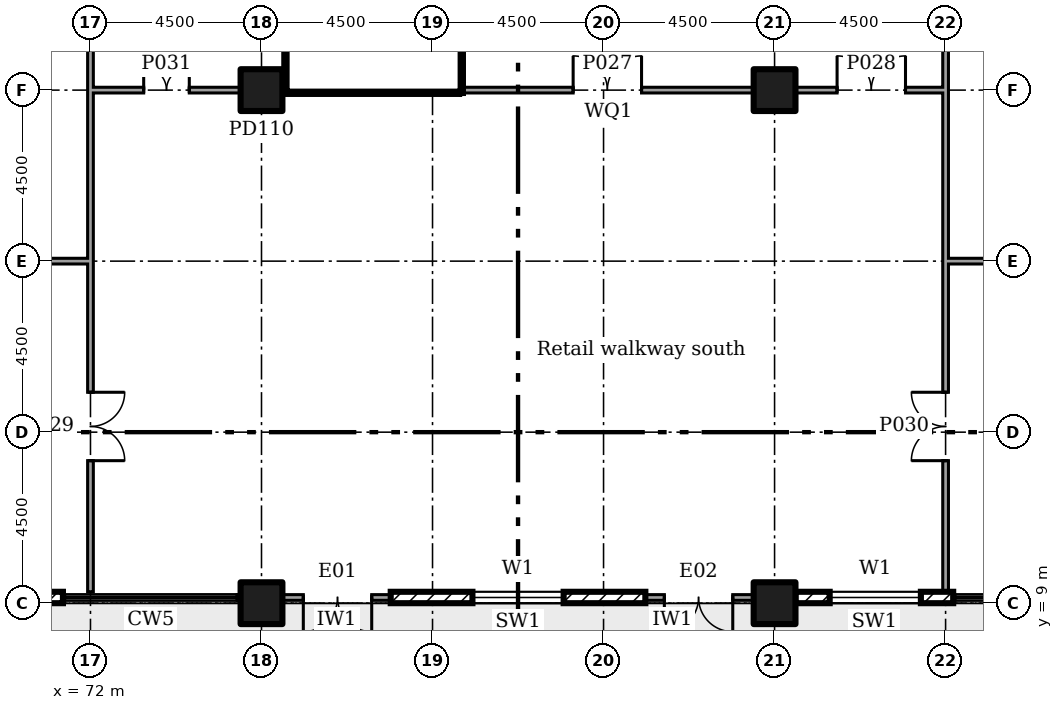
"""IFC4 building model, lengths in metres.
Left out: names, types, materials, properties, quantities, classifications, styles, units other than length and angle.
Written with IfcOpenShell. Run it as: python <this file> out.ifc"""

import sys

from ifc_helpers import new_model, si_unit, direction, frame, frame_2d, origin, origin_2d, place, context, subcontext, project, spatial, rectangle, extrude, element, fill, save


model = new_model("IFC4")
c1 = context("Model", 3, precision=1e-05, world=origin(), true_north=direction((0.0, 1.0)))
c2 = subcontext(c1, "Body", "Model", "MODEL_VIEW")
j1 = project(units=[si_unit("LENGTHUNIT", "METRE"), si_unit("PLANEANGLEUNIT", "RADIAN")], contexts=[c1])
p1 = place(None, origin())
s1 = spatial("IfcSite", under=j1, at=p1, CompositionType="ELEMENT")
p2 = place(p1, origin())
s2 = spatial("IfcBuilding", under=s1, at=p2, CompositionType="ELEMENT")
p3 = place(p2, frame((0.0, 0.0, 6.0)))
s3 = spatial("IfcBuildingStorey", under=s2, at=p3, CompositionType="ELEMENT", Elevation=6.0)
for number, where in (
    (1, (76.5, 9.0, 0.0)),
    (2, (76.5, 22.5, 0.0)),
    (3, (90.0, 9.0, 0.0)),
    (4, (90.0, 22.5, 0.0)),
):
    element("IfcColumn", number, at=place(p3, frame(where)), inside=s3, PredefinedType="COLUMN", context=c2, shape_type="SweptSolid", body=[
        extrude(rectangle(XDim=1.1, YDim=1.1, at=origin_2d()), origin(), (0.0, 0.0, 1.0), 5.5),
    ])
p4 = place(p3, frame((66.65, 9.15, 0.0)))
e5 = element("IfcWall", 5, at=p4, inside=s3, PredefinedType="ELEMENTEDWALL", context=c2, shape_type="SweptSolid", body=[
    extrude(rectangle(XDim=4.625, YDim=0.3, at=frame_2d((2.312, 0.0))), origin(), (0.0, 0.0, 1.0), 5.05),
])
p5 = place(p4, frame((2.012, 0.0, 0.45)))
e6 = element("IfcOpeningElement", 6, at=p5, cuts=e5, PredefinedType="OPENING", context=c2, shape_type="SweptSolid", body=[
    extrude(rectangle(XDim=0.6, YDim=2.4, at=frame_2d((0.3, 1.2))), frame((0.0, 0.16, 0.0), z_axis=(0.0, -1.0, 0.0), x_axis=(1.0, 0.0, 0.0)), (0.0, 0.0, 1.0), 0.32),
])
p6 = place(p3, frame((77.05, 9.15, 0.0)))
e7 = element("IfcWall", 7, at=p6, inside=s3, PredefinedType="SOLIDWALL", context=c2, shape_type="SweptSolid", body=[
    extrude(rectangle(XDim=2.85, YDim=0.15, at=frame_2d((1.425, 0.0))), origin(), (0.0, 0.0, 1.0), 5.05),
])
p7 = place(p6, frame((0.55, 0.0, 0.0)))
e8 = element("IfcOpeningElement", 8, at=p7, cuts=e7, PredefinedType="OPENING", context=c2, shape_type="SweptSolid", body=[
    extrude(rectangle(XDim=1.8, YDim=2.4, at=frame_2d((0.9, 1.2))), frame((0.0, 0.085, 0.0), z_axis=(0.0, -1.0, 0.0), x_axis=(1.0, 0.0, 0.0)), (0.0, 0.0, 1.0), 0.17),
])
p8 = place(p3, frame((79.9, 9.15, 0.0)))
e9 = element("IfcWall", 9, at=p8, inside=s3, PredefinedType="ELEMENTEDWALL", context=c2, shape_type="SweptSolid", body=[
    extrude(rectangle(XDim=6.7, YDim=0.3, at=frame_2d((3.35, 0.0))), origin(), (0.0, 0.0, 1.0), 5.05),
])
p9 = place(p8, frame((2.15, 0.0, 0.45)))
e10 = element("IfcOpeningElement", 10, at=p9, cuts=e9, PredefinedType="OPENING", context=c2, shape_type="SweptSolid", body=[
    extrude(rectangle(XDim=2.4, YDim=2.4, at=frame_2d((1.2, 1.2))), frame((0.0, 0.16, 0.0), z_axis=(0.0, -1.0, 0.0), x_axis=(1.0, 0.0, 0.0)), (0.0, 0.0, 1.0), 0.32),
])
p10 = place(p3, frame((86.6, 9.15, 0.0)))
e11 = element("IfcWall", 11, at=p10, inside=s3, PredefinedType="SOLIDWALL", context=c2, shape_type="SweptSolid", body=[
    extrude(rectangle(XDim=2.85, YDim=0.15, at=frame_2d((1.425, 0.0))), origin(), (0.0, 0.0, 1.0), 5.05),
])
p11 = place(p10, frame((0.5, 0.0, 0.0)))
e12 = element("IfcOpeningElement", 12, at=p11, cuts=e11, PredefinedType="OPENING", context=c2, shape_type="SweptSolid", body=[
    extrude(rectangle(XDim=1.8, YDim=2.4, at=frame_2d((0.9, 1.2))), frame((0.0, 0.085, 0.0), z_axis=(0.0, -1.0, 0.0), x_axis=(1.0, 0.0, 0.0)), (0.0, 0.0, 1.0), 0.17),
])
p12 = place(p3, frame((90.55, 9.15, 0.0)))
e13 = element("IfcWall", 13, at=p12, inside=s3, PredefinedType="ELEMENTEDWALL", context=c2, shape_type="SweptSolid", body=[
    extrude(rectangle(XDim=4.15, YDim=0.3, at=frame_2d((2.075, 0.0))), origin(), (0.0, 0.0, 1.0), 5.05),
])
p13 = place(p12, frame((0.9, 0.0, 0.45)))
e14 = element("IfcOpeningElement", 14, at=p13, cuts=e13, PredefinedType="OPENING", context=c2, shape_type="SweptSolid", body=[
    extrude(rectangle(XDim=2.4, YDim=2.4, at=frame_2d((1.2, 1.2))), frame((0.0, 0.16, 0.0), z_axis=(0.0, -1.0, 0.0), x_axis=(1.0, 0.0, 0.0)), (0.0, 0.0, 1.0), 0.32),
])
p14 = place(p3, frame((81.8, 22.5, 0.0)))
e15 = element("IfcWall", 15, at=p14, inside=s3, PredefinedType="PARTITIONING", context=c2, shape_type="SweptSolid", body=[
    extrude(rectangle(XDim=7.655, YDim=0.15, at=frame_2d((3.828, 0.0))), origin(), (0.0, 0.0, 1.0), 5.05),
])
p15 = place(p14, frame((2.9, 0.0, 0.0)))
e16 = element("IfcOpeningElement", 16, at=p15, cuts=e15, PredefinedType="OPENING", context=c2, shape_type="SweptSolid", body=[
    extrude(rectangle(XDim=1.8, YDim=2.1, at=frame_2d((0.9, 1.05))), frame((0.0, 0.085, 0.0), z_axis=(0.0, -1.0, 0.0), x_axis=(1.0, 0.0, 0.0)), (0.0, 0.0, 1.0), 0.17),
])
p16 = place(p3, frame((90.545, 22.5, 0.0)))
e17 = element("IfcWall", 17, at=p16, inside=s3, PredefinedType="PARTITIONING", context=c2, shape_type="SweptSolid", body=[
    extrude(rectangle(XDim=4.03, YDim=0.15, at=frame_2d((2.015, 0.0))), origin(), (0.0, 0.0, 1.0), 5.05),
])
p17 = place(p16, frame((1.1, 0.0, 0.0)))
e18 = element("IfcOpeningElement", 18, at=p17, cuts=e17, PredefinedType="OPENING", context=c2, shape_type="SweptSolid", body=[
    extrude(rectangle(XDim=1.8, YDim=2.1, at=frame_2d((0.9, 1.05))), frame((0.0, 0.085, 0.0), z_axis=(0.0, -1.0, 0.0), x_axis=(1.0, 0.0, 0.0)), (0.0, 0.0, 1.0), 0.17),
])
p18 = place(p3, frame((72.0, 9.3, 0.0), z_axis=(0.0, 0.0, 1.0), x_axis=(0.0, 1.0, 0.0)))
e19 = element("IfcWall", 19, at=p18, inside=s3, PredefinedType="PARTITIONING", context=c2, shape_type="SweptSolid", body=[
    extrude(rectangle(XDim=8.775, YDim=0.15, at=frame_2d((4.387, 0.0))), origin(), (0.0, 0.0, 1.0), 5.05),
])
p19 = place(p18, frame((3.45, 0.0, 0.0)))
e20 = element("IfcOpeningElement", 20, at=p19, cuts=e19, PredefinedType="OPENING", context=c2, shape_type="SweptSolid", body=[
    extrude(rectangle(XDim=1.8, YDim=2.1, at=frame_2d((0.9, 1.05))), frame((0.0, 0.085, 0.0), z_axis=(0.0, -1.0, 0.0), x_axis=(1.0, 0.0, 0.0)), (0.0, 0.0, 1.0), 0.17),
])
p20 = place(p3, frame((94.5, 9.3, 0.0), z_axis=(0.0, 0.0, 1.0), x_axis=(0.0, 1.0, 0.0)))
e21 = element("IfcWall", 21, at=p20, inside=s3, PredefinedType="PARTITIONING", context=c2, shape_type="SweptSolid", body=[
    extrude(rectangle(XDim=8.775, YDim=0.15, at=frame_2d((4.387, 0.0))), origin(), (0.0, 0.0, 1.0), 5.05),
])
p21 = place(p20, frame((3.45, 0.0, 0.0)))
e22 = element("IfcOpeningElement", 22, at=p21, cuts=e21, PredefinedType="OPENING", context=c2, shape_type="SweptSolid", body=[
    extrude(rectangle(XDim=1.8, YDim=2.1, at=frame_2d((0.9, 1.05))), frame((0.0, 0.085, 0.0), z_axis=(0.0, -1.0, 0.0), x_axis=(1.0, 0.0, 0.0)), (0.0, 0.0, 1.0), 0.17),
])
p22 = place(p3, frame((72.0, 18.0, 0.0), z_axis=(0.0, 0.0, 1.0), x_axis=(0.0, 1.0, 0.0)))
e23 = element("IfcWall", 23, at=p22, inside=s3, PredefinedType="PARTITIONING", context=c2, shape_type="SweptSolid", body=[
    extrude(rectangle(XDim=4.575, YDim=0.15, at=frame_2d((2.288, 0.0))), origin(), (0.0, 0.0, 1.0), 5.05),
])
p23 = place(p3, frame((94.5, 18.0, 0.0), z_axis=(0.0, 0.0, 1.0), x_axis=(0.0, 1.0, 0.0)))
e24 = element("IfcWall", 24, at=p23, inside=s3, PredefinedType="PARTITIONING", context=c2, shape_type="SweptSolid", body=[
    extrude(rectangle(XDim=4.425, YDim=0.15, at=frame_2d((2.212, 0.0))), origin(), (0.0, 0.0, 1.0), 5.05),
])
p24 = place(p3, frame((72.075, 22.5, 0.0)))
e25 = element("IfcWall", 25, at=p24, inside=s3, PredefinedType="PARTITIONING", context=c2, shape_type="SweptSolid", body=[
    extrude(rectangle(XDim=3.88, YDim=0.15, at=frame_2d((1.94, 0.0))), origin(), (0.0, 0.0, 1.0), 5.05),
])
p25 = place(p24, frame((1.325, 0.0, 0.0)))
e26 = element("IfcOpeningElement", 26, at=p25, cuts=e25, PredefinedType="OPENING", context=c2, shape_type="SweptSolid", body=[
    extrude(rectangle(XDim=1.2, YDim=2.1, at=frame_2d((0.6, 1.05))), frame((0.0, 0.085, 0.0), z_axis=(0.0, -1.0, 0.0), x_axis=(1.0, 0.0, 0.0)), (0.0, 0.0, 1.0), 0.17),
])
p26 = place(p3, frame((77.1, 22.5, 0.0)))
e27 = element("IfcWall", 27, at=p26, inside=s3, PredefinedType="SOLIDWALL", context=c2, shape_type="SweptSolid", body=[
    extrude(rectangle(XDim=4.6, YDim=0.2, at=frame_2d((2.3, 0.0))), origin(), (0.0, 0.0, 1.0), 5.05),
])
p27 = place(p3, frame((94.5, 22.5, 0.0), z_axis=(0.0, 0.0, 1.0), x_axis=(0.0, 1.0, 0.0)))
e28 = element("IfcWall", 28, at=p27, inside=s3, PredefinedType="PARTITIONING", context=c2, shape_type="SweptSolid", body=[
    extrude(rectangle(XDim=4.5, YDim=0.15, at=frame_2d((2.25, 0.0))), origin(), (0.0, 0.0, 1.0), 5.05),
])
p28 = place(p3, frame((81.7, 22.425, 0.0), z_axis=(0.0, 0.0, 1.0), x_axis=(0.0, 1.0, 0.0)))
e29 = element("IfcWall", 29, at=p28, inside=s3, PredefinedType="SOLIDWALL", context=c2, shape_type="SweptSolid", body=[
    extrude(rectangle(XDim=8.925, YDim=0.2, at=frame_2d((4.462, 0.0))), origin(), (0.0, 0.0, 1.0), 5.05),
])
p29 = place(p28, frame((7.475, 0.0, 0.0)))
e30 = element("IfcOpeningElement", 30, at=p29, cuts=e29, PredefinedType="OPENING", context=c2, shape_type="SweptSolid", body=[
    extrude(rectangle(XDim=1.1, YDim=2.1, at=frame_2d((0.55, 1.05))), frame((0.0, 0.11, 0.0), z_axis=(0.0, -1.0, 0.0), x_axis=(1.0, 0.0, 0.0)), (0.0, 0.0, 1.0), 0.22),
])
p30 = place(p3, frame((63.0, 18.0, 0.0)))
e31 = element("IfcWall", 31, at=p30, inside=s3, PredefinedType="PARTITIONING", context=c2, shape_type="SweptSolid", body=[
    extrude(rectangle(XDim=8.925, YDim=0.15, at=frame_2d((4.462, 0.0))), origin(), (0.0, 0.0, 1.0), 5.05),
])
p31 = place(p30, frame((4.0, 0.0, 0.0)))
e32 = element("IfcOpeningElement", 32, at=p31, cuts=e31, PredefinedType="OPENING", context=c2, shape_type="SweptSolid", body=[
    extrude(rectangle(XDim=1.0, YDim=2.1, at=frame_2d((0.5, 1.05))), frame((0.0, 0.085, 0.0), z_axis=(0.0, -1.0, 0.0), x_axis=(1.0, 0.0, 0.0)), (0.0, 0.0, 1.0), 0.17),
])
p32 = place(p3, frame((94.575, 18.0, 0.0)))
e33 = element("IfcWall", 33, at=p32, inside=s3, PredefinedType="PARTITIONING", context=c2, shape_type="SweptSolid", body=[
    extrude(rectangle(XDim=18.0, YDim=0.15, at=frame_2d((9.0, 0.0))), origin(), (0.0, 0.0, 1.0), 5.05),
])
p33 = place(p32, frame((8.425, 0.0, 0.0)))
e34 = element("IfcOpeningElement", 34, at=p33, cuts=e33, PredefinedType="OPENING", context=c2, shape_type="SweptSolid", body=[
    extrude(rectangle(XDim=1.0, YDim=2.1, at=frame_2d((0.5, 1.05))), frame((0.0, 0.085, 0.0), z_axis=(0.0, -1.0, 0.0), x_axis=(1.0, 0.0, 0.0)), (0.0, 0.0, 1.0), 0.17),
])
p34 = place(p3, frame((72.0, 22.5, 0.0), z_axis=(0.0, 0.0, 1.0), x_axis=(0.0, 1.0, 0.0)))
e35 = element("IfcWall", 35, at=p34, inside=s3, PredefinedType="PARTITIONING", context=c2, shape_type="SweptSolid", body=[
    extrude(rectangle(XDim=4.425, YDim=0.15, at=frame_2d((2.212, 0.0))), origin(), (0.0, 0.0, 1.0), 5.05),
])
p35 = place(p3, frame((77.2, 22.6, 0.0), z_axis=(0.0, 0.0, 1.0), x_axis=(0.0, 1.0, 0.0)))
e36 = element("IfcWall", 36, at=p35, inside=s3, PredefinedType="SOLIDWALL", context=c2, shape_type="SweptSolid", body=[
    extrude(rectangle(XDim=8.75, YDim=0.2, at=frame_2d((4.375, 0.0))), origin(), (0.0, 0.0, 1.0), 5.05),
])
p36 = place(p3, frame((81.6, 23.2, -3.0), z_axis=(0.0, 0.0, 1.0), x_axis=(-1.0, 0.0, 0.0)))
e37 = element("IfcWall", 37, at=p36, inside=s3, PredefinedType="SOLIDWALL", context=c2, shape_type="SweptSolid", body=[
    extrude(rectangle(XDim=4.3, YDim=0.2, at=frame_2d((2.15, 0.0))), origin(), (0.0, 0.0, 1.0), 5.55),
])
p37 = place(p7, frame((1.8, 0.0, 0.0), x_axis=(-1.0, 0.0, 0.0)))
e38 = element("IfcDoor", 38, at=p37, inside=s3, OperationType="DOUBLE_DOOR_DOUBLE_SWING", PredefinedType="NOTDEFINED", context=c2, shape_type="SweptSolid", body=[
    extrude(rectangle(XDim=1.8, YDim=2.4, at=frame_2d((0.9, 1.2))), frame((0.0, 0.025, 0.0), z_axis=(0.0, -1.0, 0.0), x_axis=(1.0, 0.0, 0.0)), (0.0, 0.0, 1.0), 0.05),
])
fill(e8, e38)
p38 = place(p9, origin())
e39 = element("IfcWindow", 39, at=p38, inside=s3, PartitioningType="SINGLE_PANEL", PredefinedType="WINDOW", context=c2, shape_type="SweptSolid", body=[
    extrude(rectangle(XDim=2.4, YDim=2.4, at=frame_2d((1.2, 1.2))), frame((0.0, 0.03, 0.0), z_axis=(0.0, -1.0, 0.0), x_axis=(1.0, 0.0, 0.0)), (0.0, 0.0, 1.0), 0.06),
])
fill(e10, e39)
p39 = place(p11, frame((1.8, 0.0, 0.0), x_axis=(-1.0, 0.0, 0.0)))
e40 = element("IfcDoor", 40, at=p39, inside=s3, OperationType="DOUBLE_DOOR_DOUBLE_SWING", PredefinedType="NOTDEFINED", context=c2, shape_type="SweptSolid", body=[
    extrude(rectangle(XDim=1.8, YDim=2.4, at=frame_2d((0.9, 1.2))), frame((0.0, 0.025, 0.0), z_axis=(0.0, -1.0, 0.0), x_axis=(1.0, 0.0, 0.0)), (0.0, 0.0, 1.0), 0.05),
])
fill(e12, e40)
p40 = place(p13, origin())
e41 = element("IfcWindow", 41, at=p40, inside=s3, PartitioningType="SINGLE_PANEL", PredefinedType="WINDOW", context=c2, shape_type="SweptSolid", body=[
    extrude(rectangle(XDim=2.4, YDim=2.4, at=frame_2d((1.2, 1.2))), frame((0.0, 0.03, 0.0), z_axis=(0.0, -1.0, 0.0), x_axis=(1.0, 0.0, 0.0)), (0.0, 0.0, 1.0), 0.06),
])
fill(e14, e41)
p41 = place(p15, origin())
e42 = element("IfcDoor", 42, at=p41, inside=s3, OperationType="DOUBLE_DOOR_SINGLE_SWING", PredefinedType="DOOR", context=c2, shape_type="SweptSolid", body=[
    extrude(rectangle(XDim=1.8, YDim=2.1, at=frame_2d((0.9, 1.05))), frame((0.0, 0.025, 0.0), z_axis=(0.0, -1.0, 0.0), x_axis=(1.0, 0.0, 0.0)), (0.0, 0.0, 1.0), 0.05),
])
fill(e16, e42)
p42 = place(p17, origin())
e43 = element("IfcDoor", 43, at=p42, inside=s3, OperationType="DOUBLE_DOOR_SINGLE_SWING", PredefinedType="DOOR", context=c2, shape_type="SweptSolid", body=[
    extrude(rectangle(XDim=1.8, YDim=2.1, at=frame_2d((0.9, 1.05))), frame((0.0, 0.025, 0.0), z_axis=(0.0, -1.0, 0.0), x_axis=(1.0, 0.0, 0.0)), (0.0, 0.0, 1.0), 0.05),
])
fill(e18, e43)
p43 = place(p19, frame((1.8, 0.0, 0.0), x_axis=(-1.0, 0.0, 0.0)))
e44 = element("IfcDoor", 44, at=p43, inside=s3, OperationType="DOUBLE_DOOR_SINGLE_SWING", PredefinedType="DOOR", context=c2, shape_type="SweptSolid", body=[
    extrude(rectangle(XDim=1.8, YDim=2.1, at=frame_2d((0.9, 1.05))), frame((0.0, 0.025, 0.0), z_axis=(0.0, -1.0, 0.0), x_axis=(1.0, 0.0, 0.0)), (0.0, 0.0, 1.0), 0.05),
])
fill(e20, e44)
p44 = place(p21, origin())
e45 = element("IfcDoor", 45, at=p44, inside=s3, OperationType="DOUBLE_DOOR_SINGLE_SWING", PredefinedType="DOOR", context=c2, shape_type="SweptSolid", body=[
    extrude(rectangle(XDim=1.8, YDim=2.1, at=frame_2d((0.9, 1.05))), frame((0.0, 0.025, 0.0), z_axis=(0.0, -1.0, 0.0), x_axis=(1.0, 0.0, 0.0)), (0.0, 0.0, 1.0), 0.05),
])
fill(e22, e45)
p45 = place(p25, origin())
e46 = element("IfcDoor", 46, at=p45, inside=s3, OperationType="DOUBLE_DOOR_SINGLE_SWING", PredefinedType="DOOR", context=c2, shape_type="SweptSolid", body=[
    extrude(rectangle(XDim=1.2, YDim=2.1, at=frame_2d((0.6, 1.05))), frame((0.0, 0.025, 0.0), z_axis=(0.0, -1.0, 0.0), x_axis=(1.0, 0.0, 0.0)), (0.0, 0.0, 1.0), 0.05),
])
fill(e26, e46)
save(model, sys.argv[1])
